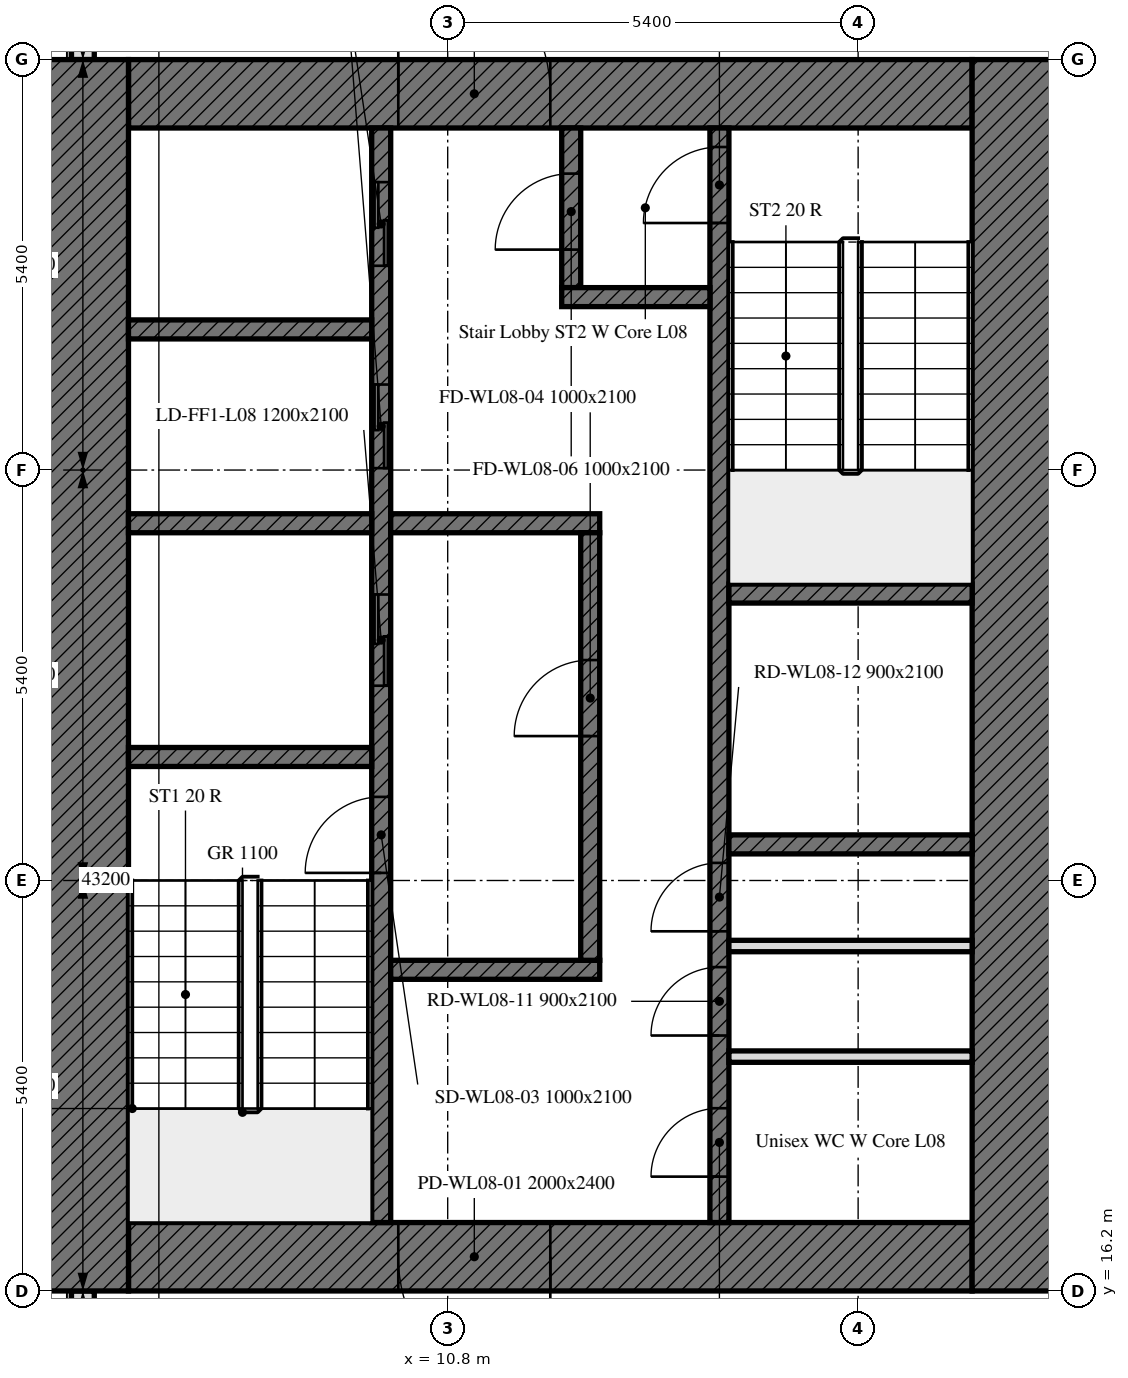
"""IFC4 building model, lengths in metres.
Left out: names, types, materials, properties, quantities, classifications, styles, units other than length and angle.
Written with IfcOpenShell. Run it as: python <this file> out.ifc"""

import sys

from ifc_helpers import new_model, si_unit, direction, frame, frame_2d, origin, place, context, subcontext, project, spatial, rectangle, extrude, element, fill, save


model = new_model("IFC4")
c1 = context("Model", 3, precision=1e-05, world=origin(), true_north=direction((0.0, 1.0)))
c2 = subcontext(c1, "Body", "Model", "MODEL_VIEW")
j1 = project(units=[si_unit("LENGTHUNIT", "METRE"), si_unit("PLANEANGLEUNIT", "RADIAN")], contexts=[c1])
p1 = place(None, origin())
s1 = spatial("IfcSite", under=j1, at=p1, CompositionType="ELEMENT")
p2 = place(p1, origin())
s2 = spatial("IfcBuilding", under=s1, at=p2, CompositionType="ELEMENT")
p3 = place(p2, frame((0.0, 0.0, 41.2)))
s3 = spatial("IfcBuildingStorey", under=s2, at=p3, CompositionType="ELEMENT", Elevation=41.2)
p4 = place(p3, frame((6.0, 37.614, 0.0), z_axis=(0.0, 0.0, 1.0), x_axis=(0.0, -1.0, 0.0)))
e1 = element("IfcWall", 1, at=p4, inside=s3, PredefinedType="SOLIDWALL", context=c2, shape_type="SweptSolid", body=[
    extrude(rectangle(XDim=5.214, YDim=0.3, at=frame_2d((2.607, 0.0))), origin(), (0.0, 0.0, 1.0), 3.5),
])
p5 = place(p4, frame((1.164, 0.0, 0.9)))
e2 = element("IfcOpeningElement", 2, at=p5, cuts=e1, PredefinedType="OPENING", context=c2, shape_type="SweptSolid", body=[
    extrude(rectangle(XDim=1.1, YDim=1.7, at=frame_2d((0.55, 0.85))), frame((0.0, 0.16, 0.0), z_axis=(0.0, -1.0, 0.0), x_axis=(1.0, 0.0, 0.0)), (0.0, 0.0, 1.0), 0.32),
])
p6 = place(p4, frame((2.764, 0.0, 0.9)))
e3 = element("IfcOpeningElement", 3, at=p6, cuts=e1, PredefinedType="OPENING", context=c2, shape_type="SweptSolid", body=[
    extrude(rectangle(XDim=1.1, YDim=1.7, at=frame_2d((0.55, 0.85))), frame((0.0, 0.16, 0.0), z_axis=(0.0, -1.0, 0.0), x_axis=(1.0, 0.0, 0.0)), (0.0, 0.0, 1.0), 0.32),
])
p7 = place(p3, frame((6.0, 16.2, 0.0), z_axis=(0.0, 0.0, 1.0), x_axis=(0.0, -1.0, 0.0)))
e4 = element("IfcWall", 4, at=p7, inside=s3, PredefinedType="SOLIDWALL", context=c2, shape_type="SweptSolid", body=[
    extrude(rectangle(XDim=10.614, YDim=0.3, at=frame_2d((5.307, 0.0))), origin(), (0.0, 0.0, 1.0), 3.5),
])
p8 = place(p7, frame((1.35, 0.0, 0.9)))
e5 = element("IfcOpeningElement", 5, at=p8, cuts=e4, PredefinedType="OPENING", context=c2, shape_type="SweptSolid", body=[
    extrude(rectangle(XDim=1.1, YDim=1.7, at=frame_2d((0.55, 0.85))), frame((0.0, 0.16, 0.0), z_axis=(0.0, -1.0, 0.0), x_axis=(1.0, 0.0, 0.0)), (0.0, 0.0, 1.0), 0.32),
])
p9 = place(p7, frame((2.95, 0.0, 0.9)))
e6 = element("IfcOpeningElement", 6, at=p9, cuts=e4, PredefinedType="OPENING", context=c2, shape_type="SweptSolid", body=[
    extrude(rectangle(XDim=1.1, YDim=1.7, at=frame_2d((0.55, 0.85))), frame((0.0, 0.16, 0.0), z_axis=(0.0, -1.0, 0.0), x_axis=(1.0, 0.0, 0.0)), (0.0, 0.0, 1.0), 0.32),
])
p10 = place(p3, frame((17.7, 16.65, 0.0), z_axis=(0.0, 0.0, 1.0), x_axis=(-1.0, 0.0, 0.0)))
e7 = element("IfcWall", 7, at=p10, inside=s3, PredefinedType="SOLIDWALL", context=c2, shape_type="SweptSolid", body=[
    extrude(rectangle(XDim=11.1, YDim=0.9, at=frame_2d((5.55, 0.0))), origin(), (0.0, 0.0, 1.0), 3.5),
])
p11 = place(p10, frame((5.55, 0.0, 0.0)))
e8 = element("IfcOpeningElement", 8, at=p11, cuts=e7, PredefinedType="OPENING", context=c2, shape_type="SweptSolid", body=[
    extrude(rectangle(XDim=2.0, YDim=2.4, at=frame_2d((1.0, 1.2))), frame((0.0, 0.45, 0.0), z_axis=(0.0, -1.0, 0.0), x_axis=(1.0, 0.0, 0.0)), (0.0, 0.0, 1.0), 0.9),
])
p12 = place(p3, frame((6.6, 31.95, 0.0), z_axis=(0.0, 0.0, 1.0), x_axis=(1.0, 0.0, 0.0)))
e9 = element("IfcWall", 9, at=p12, inside=s3, PredefinedType="SOLIDWALL", context=c2, shape_type="SweptSolid", body=[
    extrude(rectangle(XDim=11.1, YDim=0.9, at=frame_2d((5.55, 0.0))), origin(), (0.0, 0.0, 1.0), 3.5),
])
p13 = place(p12, frame((3.55, 0.0, 0.0)))
e10 = element("IfcOpeningElement", 10, at=p13, cuts=e9, PredefinedType="OPENING", context=c2, shape_type="SweptSolid", body=[
    extrude(rectangle(XDim=2.0, YDim=2.4, at=frame_2d((1.0, 1.2))), frame((0.0, 0.45, 0.0), z_axis=(0.0, -1.0, 0.0), x_axis=(1.0, 0.0, 0.0)), (0.0, 0.0, 1.0), 0.9),
])
for number, where, z_axis, x_axis in (
    (11, (6.0, 16.2, 0.0), (0.0, 0.0, 1.0), (0.0, 1.0, 0.0)),
    (12, (18.3, 32.4, 0.0), (0.0, 0.0, 1.0), (0.0, -1.0, 0.0)),
):
    element("IfcWall", number, at=place(p3, frame(where, z_axis=z_axis, x_axis=x_axis)), inside=s3, PredefinedType="SOLIDWALL", context=c2, shape_type="SweptSolid", body=[
        extrude(rectangle(XDim=16.2, YDim=1.2, at=frame_2d((8.1, 0.0))), origin(), (0.0, 0.0, 1.0), 3.5),
    ])
p14 = place(p3, frame((9.925, 17.1, 0.0), z_axis=(0.0, 0.0, 1.0), x_axis=(0.0, 1.0, 0.0)))
e13 = element("IfcWall", 13, at=p14, inside=s3, PredefinedType="SOLIDWALL", context=c2, shape_type="SweptSolid", body=[
    extrude(rectangle(XDim=14.4, YDim=0.25, at=frame_2d((7.2, 0.0))), origin(), (0.0, 0.0, 1.0), 3.5),
])
p15 = place(p14, frame((4.6, 0.0, 0.0)))
e14 = element("IfcOpeningElement", 14, at=p15, cuts=e13, PredefinedType="OPENING", context=c2, shape_type="SweptSolid", body=[
    extrude(rectangle(XDim=1.0, YDim=2.1, at=frame_2d((0.5, 1.05))), frame((0.0, 0.125, 0.0), z_axis=(0.0, -1.0, 0.0), x_axis=(1.0, 0.0, 0.0)), (0.0, 0.0, 1.0), 0.25),
])
p16 = place(p14, frame((7.062, 0.0, 0.0)))
e15 = element("IfcOpeningElement", 15, at=p16, cuts=e13, PredefinedType="OPENING", context=c2, shape_type="SweptSolid", body=[
    extrude(rectangle(XDim=1.2, YDim=2.1, at=frame_2d((0.6, 1.05))), frame((0.0, 0.125, 0.0), z_axis=(0.0, -1.0, 0.0), x_axis=(1.0, 0.0, 0.0)), (0.0, 0.0, 1.0), 0.25),
])
p17 = place(p14, frame((9.925, 0.0, 0.0)))
e16 = element("IfcOpeningElement", 16, at=p17, cuts=e13, PredefinedType="OPENING", context=c2, shape_type="SweptSolid", body=[
    extrude(rectangle(XDim=1.1, YDim=2.1, at=frame_2d((0.55, 1.05))), frame((0.0, 0.125, 0.0), z_axis=(0.0, -1.0, 0.0), x_axis=(1.0, 0.0, 0.0)), (0.0, 0.0, 1.0), 0.25),
])
p18 = place(p14, frame((12.587, 0.0, 0.0)))
e17 = element("IfcOpeningElement", 17, at=p18, cuts=e13, PredefinedType="OPENING", context=c2, shape_type="SweptSolid", body=[
    extrude(rectangle(XDim=1.1, YDim=2.1, at=frame_2d((0.55, 1.05))), frame((0.0, 0.125, 0.0), z_axis=(0.0, -1.0, 0.0), x_axis=(1.0, 0.0, 0.0)), (0.0, 0.0, 1.0), 0.25),
])
p19 = place(p3, frame((14.375, 17.1, 0.0), z_axis=(0.0, 0.0, 1.0), x_axis=(0.0, 1.0, 0.0)))
e18 = element("IfcWall", 18, at=p19, inside=s3, PredefinedType="SOLIDWALL", context=c2, shape_type="SweptSolid", body=[
    extrude(rectangle(XDim=14.4, YDim=0.25, at=frame_2d((7.2, 0.0))), origin(), (0.0, 0.0, 1.0), 3.5),
])
p20 = place(p19, frame((13.15, 0.0, 0.0)))
e19 = element("IfcOpeningElement", 19, at=p20, cuts=e18, PredefinedType="OPENING", context=c2, shape_type="SweptSolid", body=[
    extrude(rectangle(XDim=1.0, YDim=2.1, at=frame_2d((0.5, 1.05))), frame((0.0, 0.125, 0.0), z_axis=(0.0, -1.0, 0.0), x_axis=(1.0, 0.0, 0.0)), (0.0, 0.0, 1.0), 0.25),
])
p21 = place(p19, frame((0.604, 0.0, 0.0)))
e20 = element("IfcOpeningElement", 20, at=p21, cuts=e18, PredefinedType="OPENING", context=c2, shape_type="SweptSolid", body=[
    extrude(rectangle(XDim=0.9, YDim=2.1, at=frame_2d((0.45, 1.05))), frame((0.0, 0.125, 0.0), z_axis=(0.0, -1.0, 0.0), x_axis=(1.0, 0.0, 0.0)), (0.0, 0.0, 1.0), 0.25),
])
p22 = place(p19, frame((2.46, 0.0, 0.0)))
e21 = element("IfcOpeningElement", 21, at=p22, cuts=e18, PredefinedType="OPENING", context=c2, shape_type="SweptSolid", body=[
    extrude(rectangle(XDim=0.9, YDim=2.1, at=frame_2d((0.45, 1.05))), frame((0.0, 0.125, 0.0), z_axis=(0.0, -1.0, 0.0), x_axis=(1.0, 0.0, 0.0)), (0.0, 0.0, 1.0), 0.25),
])
p23 = place(p19, frame((3.832, 0.0, 0.0)))
e22 = element("IfcOpeningElement", 22, at=p23, cuts=e18, PredefinedType="OPENING", context=c2, shape_type="SweptSolid", body=[
    extrude(rectangle(XDim=0.9, YDim=2.1, at=frame_2d((0.45, 1.05))), frame((0.0, 0.125, 0.0), z_axis=(0.0, -1.0, 0.0), x_axis=(1.0, 0.0, 0.0)), (0.0, 0.0, 1.0), 0.25),
])
for number, where, z_axis, x_axis in (
    (23, (6.6, 23.225, 0.0), (0.0, 0.0, 1.0), (1.0, 0.0, 0.0)),
    (24, (14.5, 25.375, 0.0), (0.0, 0.0, 1.0), (1.0, 0.0, 0.0)),
    (25, (14.5, 22.075, 0.0), (0.0, 0.0, 1.0), (1.0, 0.0, 0.0)),
    (26, (6.6, 26.3, 0.0), (0.0, 0.0, 1.0), (1.0, 0.0, 0.0)),
):
    element("IfcWall", number, at=place(p3, frame(where, z_axis=z_axis, x_axis=x_axis)), inside=s3, PredefinedType="SOLIDWALL", context=c2, shape_type="SweptSolid", body=[
        extrude(rectangle(XDim=3.2, YDim=0.25, at=frame_2d((1.6, 0.0))), origin(), (0.0, 0.0, 1.0), 3.5),
    ])
for number, where, z_axis, x_axis in (
    (27, (10.05, 26.3, 0.0), (0.0, 0.0, 1.0), (1.0, 0.0, 0.0)),
    (28, (10.05, 20.425, 0.0), (0.0, 0.0, 1.0), (1.0, 0.0, 0.0)),
):
    element("IfcWall", number, at=place(p3, frame(where, z_axis=z_axis, x_axis=x_axis)), inside=s3, PredefinedType="SOLIDWALL", context=c2, shape_type="SweptSolid", body=[
        extrude(rectangle(XDim=2.75, YDim=0.25, at=frame_2d((1.375, 0.0))), origin(), (0.0, 0.0, 1.0), 3.5),
    ])
p24 = place(p3, frame((12.425, 29.4, 0.0), z_axis=(0.0, 0.0, 1.0), x_axis=(0.0, 1.0, 0.0)))
e29 = element("IfcWall", 29, at=p24, inside=s3, PredefinedType="SOLIDWALL", context=c2, shape_type="SweptSolid", body=[
    extrude(rectangle(XDim=2.1, YDim=0.25, at=frame_2d((1.05, 0.0))), origin(), (0.0, 0.0, 1.0), 3.5),
])
p25 = place(p24, frame((0.5, 0.0, 0.0)))
e30 = element("IfcOpeningElement", 30, at=p25, cuts=e29, PredefinedType="OPENING", context=c2, shape_type="SweptSolid", body=[
    extrude(rectangle(XDim=1.0, YDim=2.1, at=frame_2d((0.5, 1.05))), frame((0.0, 0.125, 0.0), z_axis=(0.0, -1.0, 0.0), x_axis=(1.0, 0.0, 0.0)), (0.0, 0.0, 1.0), 0.25),
])
p26 = place(p3, frame((12.3, 29.275, 0.0), z_axis=(0.0, 0.0, 1.0), x_axis=(1.0, 0.0, 0.0)))
e31 = element("IfcWall", 31, at=p26, inside=s3, PredefinedType="SOLIDWALL", context=c2, shape_type="SweptSolid", body=[
    extrude(rectangle(XDim=1.95, YDim=0.25, at=frame_2d((0.975, 0.0))), origin(), (0.0, 0.0, 1.0), 3.5),
])
p27 = place(p3, frame((12.675, 20.55, 0.0), z_axis=(0.0, 0.0, 1.0), x_axis=(0.0, 1.0, 0.0)))
e32 = element("IfcWall", 32, at=p27, inside=s3, PredefinedType="SOLIDWALL", context=c2, shape_type="SweptSolid", body=[
    extrude(rectangle(XDim=5.625, YDim=0.25, at=frame_2d((2.812, 0.0))), origin(), (0.0, 0.0, 1.0), 3.5),
])
p28 = place(p27, frame((2.95, 0.0, 0.0)))
e33 = element("IfcOpeningElement", 33, at=p28, cuts=e32, PredefinedType="OPENING", context=c2, shape_type="SweptSolid", body=[
    extrude(rectangle(XDim=1.0, YDim=2.1, at=frame_2d((0.5, 1.05))), frame((0.0, 0.125, 0.0), z_axis=(0.0, -1.0, 0.0), x_axis=(1.0, 0.0, 0.0)), (0.0, 0.0, 1.0), 0.25),
])
p29 = place(p3, frame((6.6, 28.85, 0.0), z_axis=(0.0, 0.0, 1.0), x_axis=(1.0, 0.0, 0.0)))
e34 = element("IfcWall", 34, at=p29, inside=s3, PredefinedType="SOLIDWALL", context=c2, shape_type="SweptSolid", body=[
    extrude(rectangle(XDim=3.2, YDim=0.25, at=frame_2d((1.6, 0.0))), origin(), (0.0, 0.0, 1.0), 3.5),
])
for number, where, z_axis, x_axis in (
    (35, (14.5, 19.283, 0.0), (0.0, 0.0, 1.0), (1.0, 0.0, 0.0)),
    (36, (14.5, 20.738, 0.0), (0.0, 0.0, 1.0), (1.0, 0.0, 0.0)),
):
    element("IfcWall", number, at=place(p3, frame(where, z_axis=z_axis, x_axis=x_axis)), inside=s3, PredefinedType="PARTITIONING", context=c2, shape_type="SweptSolid", body=[
        extrude(rectangle(XDim=3.2, YDim=0.15, at=frame_2d((1.6, 0.0))), origin(), (0.0, 0.0, 1.0), 3.5),
    ])
p30 = place(p11, origin())
e37 = element("IfcDoor", 37, at=p30, inside=s3, OperationType="DOUBLE_DOOR_SINGLE_SWING", PredefinedType="DOOR", context=c2, shape_type="SweptSolid", body=[
    extrude(rectangle(XDim=2.0, YDim=2.4, at=frame_2d((1.0, 1.2))), frame((0.0, 0.025, 0.0), z_axis=(0.0, -1.0, 0.0), x_axis=(1.0, 0.0, 0.0)), (0.0, 0.0, 1.0), 0.05),
])
fill(e8, e37)
p31 = place(p13, origin())
e38 = element("IfcDoor", 38, at=p31, inside=s3, OperationType="DOUBLE_DOOR_SINGLE_SWING", PredefinedType="DOOR", context=c2, shape_type="SweptSolid", body=[
    extrude(rectangle(XDim=2.0, YDim=2.4, at=frame_2d((1.0, 1.2))), frame((0.0, 0.025, 0.0), z_axis=(0.0, -1.0, 0.0), x_axis=(1.0, 0.0, 0.0)), (0.0, 0.0, 1.0), 0.05),
])
fill(e10, e38)
p32 = place(p15, origin())
e39 = element("IfcDoor", 39, at=p32, inside=s3, OperationType="SINGLE_SWING_LEFT", PredefinedType="DOOR", context=c2, shape_type="SweptSolid", body=[
    extrude(rectangle(XDim=1.0, YDim=2.1, at=frame_2d((0.5, 1.05))), frame((0.0, 0.025, 0.0), z_axis=(0.0, -1.0, 0.0), x_axis=(1.0, 0.0, 0.0)), (0.0, 0.0, 1.0), 0.05),
])
fill(e14, e39)
p33 = place(p28, origin())
e40 = element("IfcDoor", 40, at=p33, inside=s3, OperationType="SINGLE_SWING_LEFT", PredefinedType="DOOR", context=c2, shape_type="SweptSolid", body=[
    extrude(rectangle(XDim=1.0, YDim=2.1, at=frame_2d((0.5, 1.05))), frame((0.0, 0.025, 0.0), z_axis=(0.0, -1.0, 0.0), x_axis=(1.0, 0.0, 0.0)), (0.0, 0.0, 1.0), 0.05),
])
fill(e33, e40)
p34 = place(p20, origin())
e41 = element("IfcDoor", 41, at=p34, inside=s3, OperationType="SINGLE_SWING_LEFT", PredefinedType="DOOR", context=c2, shape_type="SweptSolid", body=[
    extrude(rectangle(XDim=1.0, YDim=2.1, at=frame_2d((0.5, 1.05))), frame((0.0, 0.025, 0.0), z_axis=(0.0, -1.0, 0.0), x_axis=(1.0, 0.0, 0.0)), (0.0, 0.0, 1.0), 0.05),
])
fill(e19, e41)
p35 = place(p25, origin())
e42 = element("IfcDoor", 42, at=p35, inside=s3, OperationType="SINGLE_SWING_LEFT", PredefinedType="DOOR", context=c2, shape_type="SweptSolid", body=[
    extrude(rectangle(XDim=1.0, YDim=2.1, at=frame_2d((0.5, 1.05))), frame((0.0, 0.025, 0.0), z_axis=(0.0, -1.0, 0.0), x_axis=(1.0, 0.0, 0.0)), (0.0, 0.0, 1.0), 0.05),
])
fill(e30, e42)
p36 = place(p16, origin())
e43 = element("IfcDoor", 43, at=p36, inside=s3, OperationType="DOUBLE_DOOR_SLIDING", PredefinedType="DOOR", context=c2, shape_type="SweptSolid", body=[
    extrude(rectangle(XDim=1.2, YDim=2.1, at=frame_2d((0.6, 1.05))), frame((0.0, 0.025, 0.0), z_axis=(0.0, -1.0, 0.0), x_axis=(1.0, 0.0, 0.0)), (0.0, 0.0, 1.0), 0.05),
])
fill(e15, e43)
p37 = place(p17, origin())
e44 = element("IfcDoor", 44, at=p37, inside=s3, OperationType="DOUBLE_DOOR_SLIDING", PredefinedType="DOOR", context=c2, shape_type="SweptSolid", body=[
    extrude(rectangle(XDim=1.1, YDim=2.1, at=frame_2d((0.55, 1.05))), frame((0.0, 0.025, 0.0), z_axis=(0.0, -1.0, 0.0), x_axis=(1.0, 0.0, 0.0)), (0.0, 0.0, 1.0), 0.05),
])
fill(e16, e44)
p38 = place(p18, origin())
e45 = element("IfcDoor", 45, at=p38, inside=s3, OperationType="DOUBLE_DOOR_SLIDING", PredefinedType="DOOR", context=c2, shape_type="SweptSolid", body=[
    extrude(rectangle(XDim=1.1, YDim=2.1, at=frame_2d((0.55, 1.05))), frame((0.0, 0.025, 0.0), z_axis=(0.0, -1.0, 0.0), x_axis=(1.0, 0.0, 0.0)), (0.0, 0.0, 1.0), 0.05),
])
fill(e17, e45)
p39 = place(p21, origin())
e46 = element("IfcDoor", 46, at=p39, inside=s3, OperationType="SINGLE_SWING_LEFT", PredefinedType="DOOR", context=c2, shape_type="SweptSolid", body=[
    extrude(rectangle(XDim=0.9, YDim=2.1, at=frame_2d((0.45, 1.05))), frame((0.0, 0.025, 0.0), z_axis=(0.0, -1.0, 0.0), x_axis=(1.0, 0.0, 0.0)), (0.0, 0.0, 1.0), 0.05),
])
fill(e20, e46)
p40 = place(p22, origin())
e47 = element("IfcDoor", 47, at=p40, inside=s3, OperationType="SINGLE_SWING_LEFT", PredefinedType="DOOR", context=c2, shape_type="SweptSolid", body=[
    extrude(rectangle(XDim=0.9, YDim=2.1, at=frame_2d((0.45, 1.05))), frame((0.0, 0.025, 0.0), z_axis=(0.0, -1.0, 0.0), x_axis=(1.0, 0.0, 0.0)), (0.0, 0.0, 1.0), 0.05),
])
fill(e21, e47)
p41 = place(p23, origin())
e48 = element("IfcDoor", 48, at=p41, inside=s3, OperationType="SINGLE_SWING_LEFT", PredefinedType="DOOR", context=c2, shape_type="SweptSolid", body=[
    extrude(rectangle(XDim=0.9, YDim=2.1, at=frame_2d((0.45, 1.05))), frame((0.0, 0.025, 0.0), z_axis=(0.0, -1.0, 0.0), x_axis=(1.0, 0.0, 0.0)), (0.0, 0.0, 1.0), 0.05),
])
fill(e22, e48)
save(model, sys.argv[1])
